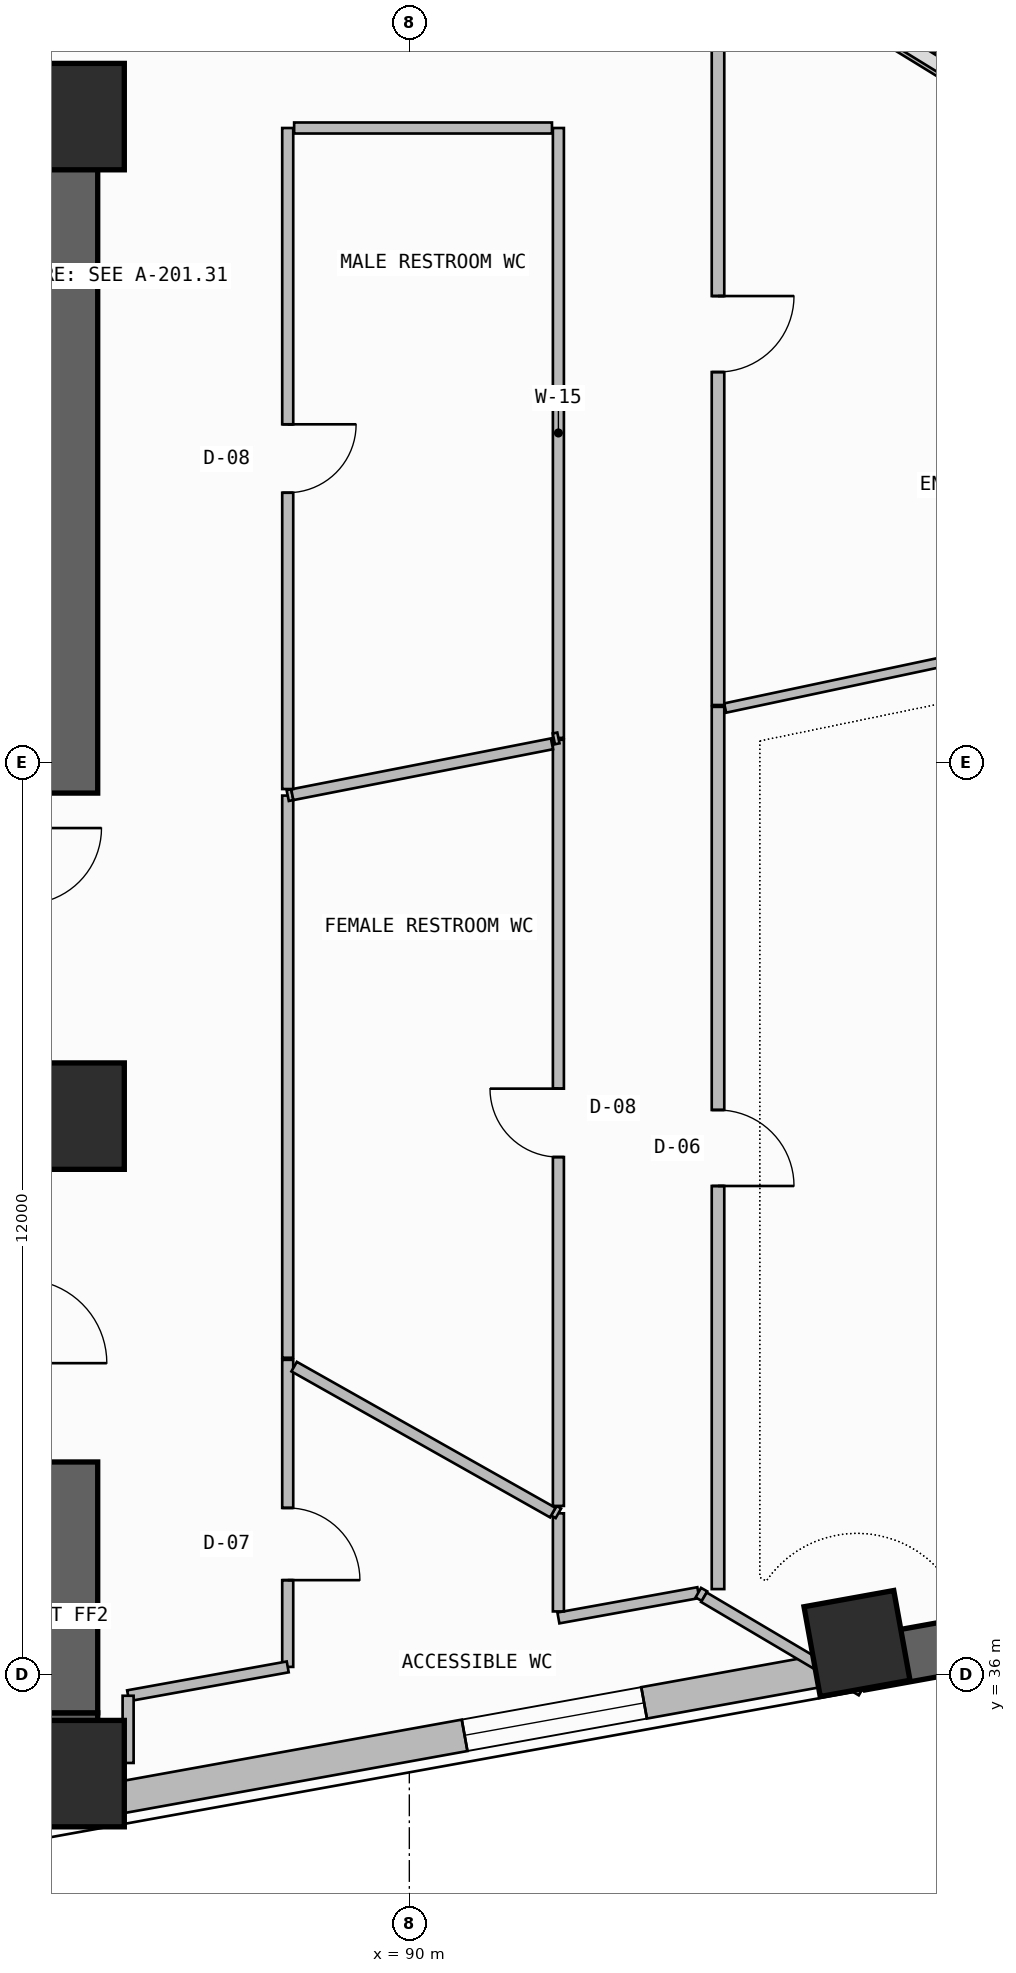
"""IFC4 building model, lengths in metres.
Left out: names, types, materials, properties, quantities, classifications, styles, units other than length and angle.
Written with IfcOpenShell. Run it as: python <this file> out.ifc"""

import sys

from ifc_helpers import new_model, si_unit, direction, frame, frame_2d, origin, origin_2d, place, context, subcontext, project, spatial, rectangle, extrude, element, fill, save


model = new_model("IFC4")
c1 = context("Model", 3, precision=1e-05, world=origin(), true_north=direction((0.0, 1.0)))
c2 = subcontext(c1, "Body", "Model", "MODEL_VIEW")
j1 = project(units=[si_unit("LENGTHUNIT", "METRE"), si_unit("PLANEANGLEUNIT", "RADIAN")], contexts=[c1])
p1 = place(None, origin())
s1 = spatial("IfcSite", under=j1, at=p1, CompositionType="ELEMENT")
p2 = place(p1, origin())
s2 = spatial("IfcBuilding", under=s1, at=p2, CompositionType="ELEMENT")
p3 = place(p2, frame((0.0, 0.0, 110.1)))
s3 = spatial("IfcBuildingStorey", under=s2, at=p3, CompositionType="ELEMENT", Elevation=110.1)
p4 = place(p3, frame((72.0, 35.05, -0.26), z_axis=(0.0, 0.0, 1.0), x_axis=(1.0, 0.0, 0.0)))
e1 = element("IfcWall", 1, at=p4, inside=s3, PredefinedType="SHEAR", context=c2, shape_type="SweptSolid", body=[
    extrude(rectangle(XDim=13.9, YDim=0.9, at=frame_2d((6.95, 0.0))), origin(), (0.0, 0.0, 1.0), 3.6),
])
p5 = place(p3, frame((85.45, 35.5, -0.26), z_axis=(0.0, 0.0, 1.0), x_axis=(0.0, 1.0, 0.0)))
e2 = element("IfcWall", 2, at=p5, inside=s3, PredefinedType="SHEAR", context=c2, shape_type="SweptSolid", body=[
    extrude(rectangle(XDim=3.3, YDim=0.9, at=frame_2d((1.65, 0.0))), origin(), (0.0, 0.0, 1.0), 3.6),
])
p6 = place(p3, frame((72.0, 56.5, -0.26), z_axis=(0.0, 0.0, 1.0), x_axis=(1.0, 0.0, 0.0)))
e3 = element("IfcWall", 3, at=p6, inside=s3, PredefinedType="SHEAR", context=c2, shape_type="SweptSolid", body=[
    extrude(rectangle(XDim=13.9, YDim=0.9, at=frame_2d((6.95, 0.0))), origin(), (0.0, 0.0, 1.0), 3.6),
])
p7 = place(p3, frame((85.45, 47.6, -0.26), z_axis=(0.0, 0.0, 1.0), x_axis=(0.0, 1.0, 0.0)))
e4 = element("IfcWall", 4, at=p7, inside=s3, PredefinedType="SHEAR", context=c2, shape_type="SweptSolid", body=[
    extrude(rectangle(XDim=8.45, YDim=0.9, at=frame_2d((4.225, 0.0))), origin(), (0.0, 0.0, 1.0), 3.6),
])
for number, where, z_axis, x_axis in (
    (5, (85.55, 34.7, 0.0), (0.0, 0.0, 1.0), (1.0, 0.0, 0.0)),
    (6, (85.55, 43.35, 0.0), (0.0, 0.0, 1.0), (1.0, 0.0, 0.0)),
    (7, (85.55, 56.5, 0.0), (0.0, 0.0, 1.0), (1.0, 0.0, 0.0)),
):
    element("IfcColumn", number, at=place(p3, frame(where, z_axis=z_axis, x_axis=x_axis)), inside=s3, PredefinedType="COLUMN", context=c2, shape_type="SweptSolid", body=[
        extrude(rectangle(XDim=1.4, YDim=1.4, at=origin_2d()), origin(), (0.0, 0.0, 1.0), 3.6),
    ])
p8 = place(p3, frame((95.89, 36.412, 0.0), z_axis=(0.0, 0.0, 1.0), x_axis=(0.984040697646, 0.177943545474, 0.0)))
e8 = element("IfcColumn", 8, at=p8, inside=s3, PredefinedType="COLUMN", context=c2, shape_type="SweptSolid", body=[
    extrude(rectangle(XDim=1.2, YDim=1.2, at=origin_2d()), origin(), (0.0, 0.0, 1.0), 3.6),
])
p9 = place(p3, frame((86.1, 34.367, 0.0), z_axis=(0.0, 0.0, 1.0), x_axis=(0.9840437071, 0.177926902172, 0.0)))
e9 = element("IfcWall", 9, at=p9, inside=s3, PredefinedType="SOLIDWALL", context=c2, shape_type="SweptSolid", body=[
    extrude(rectangle(XDim=9.997, YDim=0.42, at=frame_2d((4.999, 0.0))), origin(), (0.0, 0.0, 1.0), 2.325),
])
p10 = place(p9, frame((4.702, 0.0, 1.2)))
e10 = element("IfcOpeningElement", 10, at=p10, cuts=e9, PredefinedType="OPENING", context=c2, shape_type="SweptSolid", body=[
    extrude(rectangle(XDim=2.4, YDim=0.9, at=frame_2d((1.2, 0.45))), frame((0.0, 0.22, 0.0), z_axis=(0.0, -1.0, 0.0), x_axis=(1.0, 0.0, 0.0)), (0.0, 0.0, 1.0), 0.44),
])
p11 = place(p3, frame((95.938, 36.146, -0.26), z_axis=(0.0, 0.0, 1.0), x_axis=(0.984038488288, 0.177955762952, 0.0)))
e11 = element("IfcWall", 11, at=p11, inside=s3, PredefinedType="SHEAR", context=c2, shape_type="SweptSolid", body=[
    extrude(rectangle(XDim=16.525, YDim=0.7, at=frame_2d((8.262, 0.0))), origin(), (0.0, 0.0, 1.0), 3.6),
])
p12 = place(p11, frame((11.2, 0.0, 1.2)))
e12 = element("IfcOpeningElement", 12, at=p12, cuts=e11, PredefinedType="OPENING", context=c2, shape_type="SweptSolid", body=[
    extrude(rectangle(XDim=2.4, YDim=0.9, at=frame_2d((1.2, 0.45))), frame((0.0, 0.36, 0.0), z_axis=(0.0, -1.0, 0.0), x_axis=(1.0, 0.0, 0.0)), (0.0, 0.0, 1.0), 0.72),
])
p13 = place(p3, frame((119.865, 43.07, 0.0), z_axis=(0.0, 0.0, 1.0), x_axis=(-0.852110824326, 0.52336138859, 0.0)))
e13 = element("IfcWall", 13, at=p13, inside=s3, PredefinedType="PARAPET", context=c2, shape_type="SweptSolid", body=[
    extrude(rectangle(XDim=33.932, YDim=0.2, at=frame_2d((16.966, 0.0))), origin(), (0.0, 0.0, 1.0), 1.15),
])
p14 = place(p3, frame((88.4, 36.104, 0.0), z_axis=(0.0, 0.0, 1.0), x_axis=(0.0, 1.0, 0.0)))
e14 = element("IfcWall", 14, at=p14, inside=s3, PredefinedType="PARTITIONING", context=c2, shape_type="SweptSolid", body=[
    extrude(rectangle(XDim=4.04, YDim=0.145, at=frame_2d((2.02, 0.0))), origin(), (0.0, 0.0, 1.0), 3.34),
])
p15 = place(p14, frame((1.141, 0.0, 0.0)))
e15 = element("IfcOpeningElement", 15, at=p15, cuts=e14, PredefinedType="OPENING", context=c2, shape_type="SweptSolid", body=[
    extrude(rectangle(XDim=0.95, YDim=2.15, at=frame_2d((0.475, 1.075))), frame((0.0, 0.083, 0.0), z_axis=(0.0, -1.0, 0.0), x_axis=(1.0, 0.0, 0.0)), (0.0, 0.0, 1.0), 0.165),
])
p16 = place(p3, frame((86.3, 35.724, 0.0), z_axis=(0.0, 0.0, 1.0), x_axis=(0.984046990905, 0.177908739781, 0.0)))
e16 = element("IfcWall", 16, at=p16, inside=s3, PredefinedType="PARTITIONING", context=c2, shape_type="SweptSolid", body=[
    extrude(rectangle(XDim=2.134, YDim=0.145, at=frame_2d((1.067, 0.0))), origin(), (0.0, 0.0, 1.0), 3.34),
])
p17 = place(p3, frame((91.961, 36.748, 0.0), z_axis=(0.0, 0.0, 1.0), x_axis=(0.984032355116, 0.177989674099, 0.0)))
e17 = element("IfcWall", 17, at=p17, inside=s3, PredefinedType="PARTITIONING", context=c2, shape_type="SweptSolid", body=[
    extrude(rectangle(XDim=1.871, YDim=0.145, at=frame_2d((0.936, 0.0))), origin(), (0.0, 0.0, 1.0), 3.34),
])
p18 = place(p3, frame((91.961, 38.125, 0.0), z_axis=(0.0, 0.0, 1.0), x_axis=(0.0, -1.0, 0.0)))
e18 = element("IfcWall", 18, at=p18, inside=s3, PredefinedType="PARTITIONING", context=c2, shape_type="SweptSolid", body=[
    extrude(rectangle(XDim=1.291, YDim=0.145, at=frame_2d((0.646, 0.0))), origin(), (0.0, 0.0, 1.0), 2.875),
])
p19 = place(p3, frame((93.802, 37.081, 0.0), z_axis=(0.0, 0.0, 1.0), x_axis=(0.870320077179, -0.492486510739, 0.0)))
e19 = element("IfcWall", 19, at=p19, inside=s3, PredefinedType="PARTITIONING", context=c2, shape_type="SweptSolid", body=[
    extrude(rectangle(XDim=0.094, YDim=0.145, at=frame_2d((0.047, 0.0))), origin(), (0.0, 0.0, 1.0), 3.34),
])
p20 = place(p3, frame((91.901, 38.159, 0.0), z_axis=(0.0, 0.0, 1.0), x_axis=(0.869768280547, -0.493460371412, 0.0)))
e20 = element("IfcWall", 20, at=p20, inside=s3, PredefinedType="PARTITIONING", context=c2, shape_type="SweptSolid", body=[
    extrude(rectangle(XDim=0.069, YDim=0.145, at=frame_2d((0.034, 0.0))), origin(), (0.0, 0.0, 1.0), 2.875),
])
p21 = place(p3, frame((88.485, 40.055, 0.0), z_axis=(0.0, 0.0, 1.0), x_axis=(0.870841997386, -0.49156303318, 0.0)))
e21 = element("IfcWall", 21, at=p21, inside=s3, PredefinedType="PARTITIONING", context=c2, shape_type="SweptSolid", body=[
    extrude(rectangle(XDim=3.907, YDim=0.145, at=frame_2d((1.954, 0.0))), origin(), (0.0, 0.0, 1.0), 2.875),
])
p22 = place(p3, frame((93.876, 37.021, 0.0), z_axis=(0.0, 0.0, 1.0), x_axis=(0.860525041789, -0.509408139367, 0.0)))
e22 = element("IfcWall", 22, at=p22, inside=s3, PredefinedType="PARTITIONING", context=c2, shape_type="SweptSolid", body=[
    extrude(rectangle(XDim=2.411, YDim=0.145, at=frame_2d((1.205, 0.0))), origin(), (0.0, 0.0, 1.0), 2.725),
])
p23 = place(p3, frame((91.961, 48.301, 0.0), z_axis=(0.0, 0.0, 1.0), x_axis=(0.0, -1.0, 0.0)))
e23 = element("IfcWall", 23, at=p23, inside=s3, PredefinedType="PARTITIONING", context=c2, shape_type="SweptSolid", body=[
    extrude(rectangle(XDim=10.079, YDim=0.145, at=frame_2d((5.04, 0.0))), origin(), (0.0, 0.0, 1.0), 2.725),
])
p24 = place(p23, frame((4.59, 0.0, 0.0)))
e24 = element("IfcOpeningElement", 24, at=p24, cuts=e23, PredefinedType="OPENING", context=c2, shape_type="SweptSolid", body=[
    extrude(rectangle(XDim=0.9, YDim=2.1, at=frame_2d((0.45, 1.05))), frame((0.0, 0.083, 0.0), z_axis=(0.0, -1.0, 0.0), x_axis=(1.0, 0.0, 0.0)), (0.0, 0.0, 1.0), 0.165),
])
p25 = place(p3, frame((88.4, 40.171, 0.0), z_axis=(0.0, 0.0, 1.0), x_axis=(0.0, 1.0, 0.0)))
e25 = element("IfcWall", 25, at=p25, inside=s3, PredefinedType="PARTITIONING", context=c2, shape_type="SweptSolid", body=[
    extrude(rectangle(XDim=7.396, YDim=0.145, at=frame_2d((3.698, 0.0))), origin(), (0.0, 0.0, 1.0), 2.725),
])
p26 = place(p3, frame((88.4, 47.567, 0.0), z_axis=(0.0, 0.0, 1.0), x_axis=(0.979963027805, 0.199179477196, 0.0)))
e26 = element("IfcWall", 26, at=p26, inside=s3, PredefinedType="PARTITIONING", context=c2, shape_type="SweptSolid", body=[
    extrude(rectangle(XDim=0.061, YDim=0.145, at=frame_2d((0.031, 0.0))), origin(), (0.0, 0.0, 1.0), 3.34),
])
p27 = place(p3, frame((88.46, 47.579, 0.0), z_axis=(0.0, 0.0, 1.0), x_axis=(0.981352415041, 0.192217162329, 0.0)))
e27 = element("IfcWall", 27, at=p27, inside=s3, PredefinedType="PARTITIONING", context=c2, shape_type="SweptSolid", body=[
    extrude(rectangle(XDim=3.481, YDim=0.145, at=frame_2d((1.741, 0.0))), origin(), (0.0, 0.0, 1.0), 2.875),
])
p28 = place(p3, frame((94.061, 37.128, 0.0), z_axis=(0.0, 0.0, 1.0), x_axis=(0.0, 1.0, 0.0)))
e28 = element("IfcWall", 28, at=p28, inside=s3, PredefinedType="PARTITIONING", context=c2, shape_type="SweptSolid", body=[
    extrude(rectangle(XDim=11.607, YDim=0.165, at=frame_2d((5.803, 0.0))), origin(), (0.0, 0.0, 1.0), 2.725),
])
p29 = place(p28, frame((5.303, 0.0, 0.0)))
e29 = element("IfcOpeningElement", 29, at=p29, cuts=e28, PredefinedType="OPENING", context=c2, shape_type="SweptSolid", body=[
    extrude(rectangle(XDim=1.0, YDim=2.2, at=frame_2d((0.5, 1.1))), frame((0.0, 0.093, 0.0), z_axis=(0.0, -1.0, 0.0), x_axis=(1.0, 0.0, 0.0)), (0.0, 0.0, 1.0), 0.185),
])
p30 = place(p3, frame((94.156, 48.719, 0.0), z_axis=(0.0, 0.0, 1.0), x_axis=(0.978192494571, 0.207700369679, 0.0)))
e30 = element("IfcWall", 30, at=p30, inside=s3, PredefinedType="PARTITIONING", context=c2, shape_type="SweptSolid", body=[
    extrude(rectangle(XDim=12.776, YDim=0.125, at=frame_2d((6.388, 0.0))), origin(), (0.0, 0.0, 1.0), 2.725),
])
p31 = place(p3, frame((94.061, 48.759, 0.0), z_axis=(0.0, 0.0, 1.0), x_axis=(0.0, 1.0, 0.0)))
e31 = element("IfcWall", 31, at=p31, inside=s3, PredefinedType="PARTITIONING", context=c2, shape_type="SweptSolid", body=[
    extrude(rectangle(XDim=9.761, YDim=0.165, at=frame_2d((4.88, 0.0))), origin(), (0.0, 0.0, 1.0), 2.725),
])
p32 = place(p31, frame((4.38, 0.0, 0.0)))
e32 = element("IfcOpeningElement", 32, at=p32, cuts=e31, PredefinedType="OPENING", context=c2, shape_type="SweptSolid", body=[
    extrude(rectangle(XDim=1.0, YDim=2.2, at=frame_2d((0.5, 1.1))), frame((0.0, 0.093, 0.0), z_axis=(0.0, -1.0, 0.0), x_axis=(1.0, 0.0, 0.0)), (0.0, 0.0, 1.0), 0.185),
])
p33 = place(p3, frame((88.4, 47.653, 0.0), z_axis=(0.0, 0.0, 1.0), x_axis=(0.0, 1.0, 0.0)))
e33 = element("IfcWall", 33, at=p33, inside=s3, PredefinedType="PARTITIONING", context=c2, shape_type="SweptSolid", body=[
    extrude(rectangle(XDim=8.697, YDim=0.145, at=frame_2d((4.348, 0.0))), origin(), (0.0, 0.0, 1.0), 2.725),
])
p34 = place(p33, frame((3.898, 0.0, 0.0)))
e34 = element("IfcOpeningElement", 34, at=p34, cuts=e33, PredefinedType="OPENING", context=c2, shape_type="SweptSolid", body=[
    extrude(rectangle(XDim=0.9, YDim=2.1, at=frame_2d((0.45, 1.05))), frame((0.0, 0.083, 0.0), z_axis=(0.0, -1.0, 0.0), x_axis=(1.0, 0.0, 0.0)), (0.0, 0.0, 1.0), 0.165),
])
p35 = place(p3, frame((91.961, 56.35, 0.0), z_axis=(0.0, 0.0, 1.0), x_axis=(0.0, -1.0, 0.0)))
e35 = element("IfcWall", 35, at=p35, inside=s3, PredefinedType="PARTITIONING", context=c2, shape_type="SweptSolid", body=[
    extrude(rectangle(XDim=8.024, YDim=0.145, at=frame_2d((4.012, 0.0))), origin(), (0.0, 0.0, 1.0), 2.725),
])
p36 = place(p3, frame((88.485, 56.35, 0.0), z_axis=(0.0, 0.0, 1.0), x_axis=(1.0, 0.0, 0.0)))
e36 = element("IfcWall", 36, at=p36, inside=s3, PredefinedType="PARTITIONING", context=c2, shape_type="SweptSolid", body=[
    extrude(rectangle(XDim=3.392, YDim=0.145, at=frame_2d((1.696, 0.0))), origin(), (0.0, 0.0, 1.0), 2.875),
])
p37 = place(p3, frame((91.961, 48.326, 0.0), z_axis=(0.0, 0.0, 1.0), x_axis=(-0.97980405878, -0.199960011996, 0.0)))
e37 = element("IfcWall", 37, at=p37, inside=s3, PredefinedType="PARTITIONING", context=c2, shape_type="SweptSolid", body=[
    extrude(rectangle(XDim=0.061, YDim=0.145, at=frame_2d((0.031, 0.0))), origin(), (0.0, 0.0, 1.0), 2.875),
])
p38 = place(p3, frame((86.3, 34.84, 0.0), z_axis=(0.0, 0.0, 1.0), x_axis=(0.0, 1.0, 0.0)))
e38 = element("IfcWall", 38, at=p38, inside=s3, PredefinedType="PARTITIONING", context=c2, shape_type="SweptSolid", body=[
    extrude(rectangle(XDim=0.884, YDim=0.145, at=frame_2d((0.442, 0.0))), origin(), (0.0, 0.0, 1.0), 2.725),
])
p39 = place(p10, origin())
e39 = element("IfcWindow", 39, at=p39, inside=s3, PartitioningType="SINGLE_PANEL", PredefinedType="WINDOW", context=c2, shape_type="SweptSolid", body=[
    extrude(rectangle(XDim=2.4, YDim=0.9, at=frame_2d((1.2, 0.45))), frame((0.0, 0.03, 0.0), z_axis=(0.0, -1.0, 0.0), x_axis=(1.0, 0.0, 0.0)), (0.0, 0.0, 1.0), 0.06),
])
fill(e10, e39)
p40 = place(p15, frame((0.95, 0.0, 0.0), z_axis=(0.0, 0.0, 1.0), x_axis=(-1.0, 0.0, 0.0)))
e40 = element("IfcDoor", 40, at=p40, inside=s3, OperationType="SINGLE_SWING_RIGHT", PredefinedType="DOOR", context=c2, shape_type="SweptSolid", body=[
    extrude(rectangle(XDim=0.95, YDim=2.15, at=frame_2d((0.475, 1.075))), frame((0.0, 0.025, 0.0), z_axis=(0.0, -1.0, 0.0), x_axis=(1.0, 0.0, 0.0)), (0.0, 0.0, 1.0), 0.05),
])
fill(e15, e40)
p41 = place(p24, frame((0.9, 0.0, 0.0), z_axis=(0.0, 0.0, 1.0), x_axis=(-1.0, 0.0, 0.0)))
e41 = element("IfcDoor", 41, at=p41, inside=s3, OperationType="SINGLE_SWING_RIGHT", PredefinedType="DOOR", context=c2, shape_type="SweptSolid", body=[
    extrude(rectangle(XDim=0.9, YDim=2.1, at=frame_2d((0.45, 1.05))), frame((0.0, 0.025, 0.0), z_axis=(0.0, -1.0, 0.0), x_axis=(1.0, 0.0, 0.0)), (0.0, 0.0, 1.0), 0.05),
])
fill(e24, e41)
p42 = place(p29, frame((1.0, 0.0, 0.0), z_axis=(0.0, 0.0, 1.0), x_axis=(-1.0, 0.0, 0.0)))
e42 = element("IfcDoor", 42, at=p42, inside=s3, OperationType="SINGLE_SWING_RIGHT", PredefinedType="DOOR", context=c2, shape_type="SweptSolid", body=[
    extrude(rectangle(XDim=1.0, YDim=2.2, at=frame_2d((0.5, 1.1))), frame((0.0, 0.025, 0.0), z_axis=(0.0, -1.0, 0.0), x_axis=(1.0, 0.0, 0.0)), (0.0, 0.0, 1.0), 0.05),
])
fill(e29, e42)
p43 = place(p32, frame((1.0, 0.0, 0.0), z_axis=(0.0, 0.0, 1.0), x_axis=(-1.0, 0.0, 0.0)))
e43 = element("IfcDoor", 43, at=p43, inside=s3, OperationType="SINGLE_SWING_LEFT", PredefinedType="DOOR", context=c2, shape_type="SweptSolid", body=[
    extrude(rectangle(XDim=1.0, YDim=2.2, at=frame_2d((0.5, 1.1))), frame((0.0, 0.025, 0.0), z_axis=(0.0, -1.0, 0.0), x_axis=(1.0, 0.0, 0.0)), (0.0, 0.0, 1.0), 0.05),
])
fill(e32, e43)
p44 = place(p34, frame((0.9, 0.0, 0.0), z_axis=(0.0, 0.0, 1.0), x_axis=(-1.0, 0.0, 0.0)))
e44 = element("IfcDoor", 44, at=p44, inside=s3, OperationType="SINGLE_SWING_LEFT", PredefinedType="DOOR", context=c2, shape_type="SweptSolid", body=[
    extrude(rectangle(XDim=0.9, YDim=2.1, at=frame_2d((0.45, 1.05))), frame((0.0, 0.025, 0.0), z_axis=(0.0, -1.0, 0.0), x_axis=(1.0, 0.0, 0.0)), (0.0, 0.0, 1.0), 0.05),
])
fill(e34, e44)
save(model, sys.argv[1])
